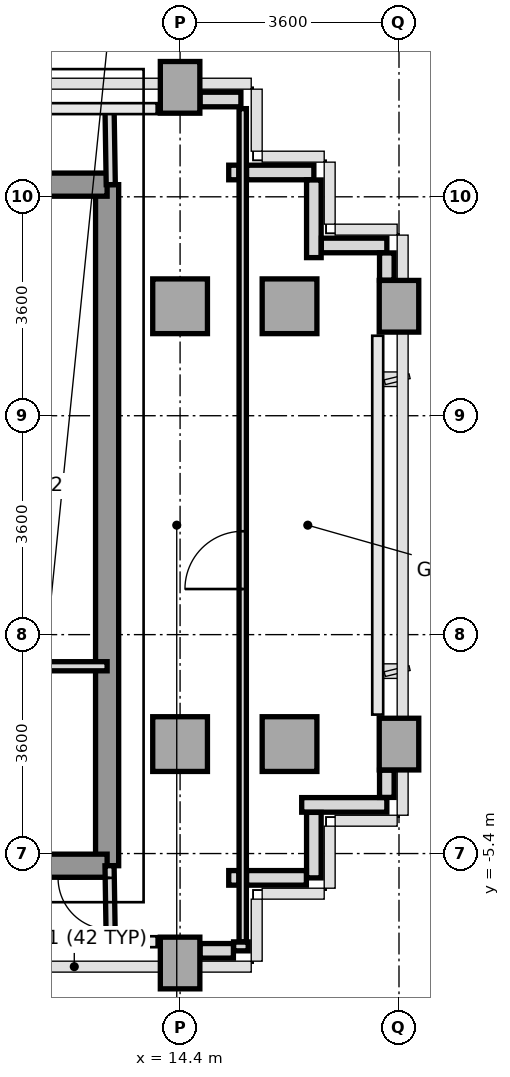
"""IFC4 building model, lengths in metres.
Left out: names, types, materials, properties, quantities, classifications, styles, units other than length and angle.
Written with IfcOpenShell. Run it as: python <this file> out.ifc"""

import sys

from ifc_helpers import new_model, si_unit, direction, frame, frame_2d, origin, origin_2d, place, context, subcontext, project, spatial, rectangle, extrude, source, transform, mapped, element, fill, save


model = new_model("IFC4")
c1 = context("Model", 3, precision=1e-05, world=origin(), true_north=direction((0.0, 1.0)))
c2 = subcontext(c1, "Body", "Model", "MODEL_VIEW")
j1 = project(units=[si_unit("LENGTHUNIT", "METRE"), si_unit("PLANEANGLEUNIT", "RADIAN")], contexts=[c1])
p1 = place(None, origin())
s1 = spatial("IfcSite", under=j1, at=p1, CompositionType="ELEMENT")
p2 = place(p1, origin())
s2 = spatial("IfcBuilding", under=s1, at=p2, CompositionType="ELEMENT")
p3 = place(p2, frame((0.0, 0.0, 163.8)))
s3 = spatial("IfcBuildingStorey", under=s2, at=p3, CompositionType="ELEMENT", Elevation=163.8)
m1 = source(origin(), c2, "Body", "SweptSolid", [
    extrude(rectangle(XDim=0.65, YDim=0.85, at=origin_2d()), origin(), (0.0, 0.0, 1.0), 3.2),
])
p4 = place(p3, frame((14.4, -7.2, 0.0), z_axis=(0.0, 0.0, 1.0), x_axis=(1.0, 0.0, 0.0)))
e1 = element("IfcColumn", 1, at=p4, inside=s3, PredefinedType="COLUMN", context=c2, shape_type="MappedRepresentation", body=[
    mapped(m1, transform((0.0, 0.0, 0.0), x_axis=(1.0, 0.0, 0.0), y_axis=(0.0, 1.0, 0.0), z_axis=(0.0, 0.0, 1.0), scale=1.0)),
])
m2 = source(origin(), c2, "Body", "SweptSolid", [
    extrude(rectangle(XDim=0.9, YDim=0.9, at=origin_2d()), origin(), (0.0, 0.0, 1.0), 3.2),
])
for number, where, z_axis, x_axis in (
    (2, (14.4, -3.6, 0.0), (0.0, 0.0, 1.0), (1.0, 0.0, 0.0)),
    (3, (14.4, 3.6, 0.0), (0.0, 0.0, 1.0), (1.0, 0.0, 0.0)),
):
    element("IfcColumn", number, at=place(p3, frame(where, z_axis=z_axis, x_axis=x_axis)), inside=s3, PredefinedType="COLUMN", context=c2, shape_type="MappedRepresentation", body=[
        mapped(m2, transform((0.0, 0.0, 0.0), x_axis=(1.0, 0.0, 0.0), y_axis=(0.0, 1.0, 0.0), z_axis=(0.0, 0.0, 1.0), scale=1.0)),
    ])
p5 = place(p3, frame((14.4, 7.2, 0.0), z_axis=(0.0, 0.0, 1.0), x_axis=(1.0, 0.0, 0.0)))
e4 = element("IfcColumn", 4, at=p5, inside=s3, PredefinedType="COLUMN", context=c2, shape_type="MappedRepresentation", body=[
    mapped(m1, transform((0.0, 0.0, 0.0), x_axis=(1.0, 0.0, 0.0), y_axis=(0.0, 1.0, 0.0), z_axis=(0.0, 0.0, 1.0), scale=1.0)),
])
for number, where, z_axis, x_axis in (
    (5, (16.2, -3.6, 0.0), (0.0, 0.0, 1.0), (1.0, 0.0, 0.0)),
    (6, (16.2, 3.6, 0.0), (0.0, 0.0, 1.0), (1.0, 0.0, 0.0)),
):
    element("IfcColumn", number, at=place(p3, frame(where, z_axis=z_axis, x_axis=x_axis)), inside=s3, PredefinedType="COLUMN", context=c2, shape_type="MappedRepresentation", body=[
        mapped(m2, transform((0.0, 0.0, 0.0), x_axis=(1.0, 0.0, 0.0), y_axis=(0.0, 1.0, 0.0), z_axis=(0.0, 0.0, 1.0), scale=1.0)),
    ])
for number, where, z_axis, x_axis in (
    (7, (18.0, -3.6, 0.0), (0.0, 0.0, 1.0), (1.0, 0.0, 0.0)),
    (8, (18.0, 3.6, 0.0), (0.0, 0.0, 1.0), (1.0, 0.0, 0.0)),
):
    element("IfcColumn", number, at=place(p3, frame(where, z_axis=z_axis, x_axis=x_axis)), inside=s3, PredefinedType="COLUMN", context=c2, shape_type="MappedRepresentation", body=[
        mapped(m1, transform((0.0, 0.0, 0.0), x_axis=(1.0, 0.0, 0.0), y_axis=(0.0, 1.0, 0.0), z_axis=(0.0, 0.0, 1.0), scale=1.0)),
    ])
p6 = place(p3, frame((17.8, -4.6, 0.0), z_axis=(0.0, 0.0, 1.0), x_axis=(-1.0, 0.0, 0.0)))
e9 = element("IfcWall", 9, at=p6, inside=s3, PredefinedType="PARAPET", context=c2, shape_type="SweptSolid", body=[
    extrude(rectangle(XDim=1.4, YDim=0.24, at=frame_2d((0.7, 0.0))), origin(), (0.0, 0.0, 1.0), 1.15),
])
p7 = place(p3, frame((16.6, -4.723, 0.0), z_axis=(0.0, 0.0, 1.0), x_axis=(0.0, -1.0, 0.0)))
e10 = element("IfcWall", 10, at=p7, inside=s3, PredefinedType="PARAPET", context=c2, shape_type="SweptSolid", body=[
    extrude(rectangle(XDim=1.077, YDim=0.24, at=frame_2d((0.539, 0.0))), origin(), (0.0, 0.0, 1.0), 1.15),
])
p8 = place(p3, frame((16.477, -5.8, 0.0), z_axis=(0.0, 0.0, 1.0), x_axis=(-1.0, 0.0, 0.0)))
e11 = element("IfcWall", 11, at=p8, inside=s3, PredefinedType="PARAPET", context=c2, shape_type="SweptSolid", body=[
    extrude(rectangle(XDim=0.984, YDim=0.24, at=frame_2d((0.492, 0.0))), origin(), (0.0, 0.0, 1.0), 1.15),
])
p9 = place(p3, frame((15.367, -5.8, 0.0), z_axis=(0.0, 0.0, 1.0), x_axis=(-1.0, 0.0, 0.0)))
e12 = element("IfcWall", 12, at=p9, inside=s3, PredefinedType="PARAPET", context=c2, shape_type="SweptSolid", body=[
    extrude(rectangle(XDim=0.167, YDim=0.24, at=frame_2d((0.083, 0.0))), origin(), (0.0, 0.0, 1.0), 1.15),
])
p10 = place(p3, frame((15.4, -6.853, 0.0), z_axis=(0.0, 0.0, 1.0), x_axis=(0.0, -1.0, 0.0)))
e13 = element("IfcWall", 13, at=p10, inside=s3, PredefinedType="PARAPET", context=c2, shape_type="SweptSolid", body=[
    extrude(rectangle(XDim=0.147, YDim=0.24, at=frame_2d((0.073, 0.0))), origin(), (0.0, 0.0, 1.0), 1.15),
])
p11 = place(p3, frame((15.277, -7.0, 0.0), z_axis=(0.0, 0.0, 1.0), x_axis=(-1.0, 0.0, 0.0)))
e14 = element("IfcWall", 14, at=p11, inside=s3, PredefinedType="PARAPET", context=c2, shape_type="SweptSolid", body=[
    extrude(rectangle(XDim=0.549, YDim=0.24, at=frame_2d((0.274, 0.0))), origin(), (0.0, 0.0, 1.0), 1.15),
])
p12 = place(p3, frame((14.728, 7.0, 0.0), z_axis=(0.0, 0.0, 1.0), x_axis=(1.0, 0.0, 0.0)))
e15 = element("IfcWall", 15, at=p12, inside=s3, PredefinedType="PARAPET", context=c2, shape_type="SweptSolid", body=[
    extrude(rectangle(XDim=0.672, YDim=0.24, at=frame_2d((0.336, 0.0))), origin(), (0.0, 0.0, 1.0), 1.15),
])
p13 = place(p3, frame((15.2, 5.8, 0.0), z_axis=(0.0, 0.0, 1.0), x_axis=(1.0, 0.0, 0.0)))
e16 = element("IfcWall", 16, at=p13, inside=s3, PredefinedType="PARAPET", context=c2, shape_type="SweptSolid", body=[
    extrude(rectangle(XDim=0.167, YDim=0.24, at=frame_2d((0.083, 0.0))), origin(), (0.0, 0.0, 1.0), 1.15),
])
p14 = place(p3, frame((15.493, 5.8, 0.0), z_axis=(0.0, 0.0, 1.0), x_axis=(1.0, 0.0, 0.0)))
e17 = element("IfcWall", 17, at=p14, inside=s3, PredefinedType="PARAPET", context=c2, shape_type="SweptSolid", body=[
    extrude(rectangle(XDim=1.107, YDim=0.24, at=frame_2d((0.554, 0.0))), origin(), (0.0, 0.0, 1.0), 1.15),
])
p15 = place(p3, frame((16.6, 5.677, 0.0), z_axis=(0.0, 0.0, 1.0), x_axis=(0.0, -1.0, 0.0)))
e18 = element("IfcWall", 18, at=p15, inside=s3, PredefinedType="PARAPET", context=c2, shape_type="SweptSolid", body=[
    extrude(rectangle(XDim=1.277, YDim=0.24, at=frame_2d((0.639, 0.0))), origin(), (0.0, 0.0, 1.0), 1.15),
])
p16 = place(p3, frame((16.723, 4.6, 0.0), z_axis=(0.0, 0.0, 1.0), x_axis=(1.0, 0.0, 0.0)))
e19 = element("IfcWall", 19, at=p16, inside=s3, PredefinedType="PARAPET", context=c2, shape_type="SweptSolid", body=[
    extrude(rectangle(XDim=1.077, YDim=0.24, at=frame_2d((0.539, 0.0))), origin(), (0.0, 0.0, 1.0), 1.15),
])
for number, where, z_axis, x_axis in (
    (20, (17.8, 4.477, 0.0), (0.0, 0.0, 1.0), (0.0, -1.0, 0.0)),
    (21, (17.8, -4.028, 0.0), (0.0, 0.0, 1.0), (0.0, -1.0, 0.0)),
):
    element("IfcWall", number, at=place(p3, frame(where, z_axis=z_axis, x_axis=x_axis)), inside=s3, PredefinedType="PARAPET", context=c2, shape_type="SweptSolid", body=[
        extrude(rectangle(XDim=0.449, YDim=0.24, at=frame_2d((0.225, 0.0))), origin(), (0.0, 0.0, 1.0), 1.15),
    ])
p17 = place(p3, frame((13.2, -5.6, 0.0), z_axis=(0.0, 0.0, 1.0), x_axis=(0.0, 1.0, 0.0)))
e22 = element("IfcWall", 22, at=p17, inside=s3, PredefinedType="SHEAR", context=c2, shape_type="SweptSolid", body=[
    extrude(rectangle(XDim=11.2, YDim=0.38, at=frame_2d((5.6, 0.0))), origin(), (0.0, 0.0, 1.0), 3.2),
])
p18 = place(p3, frame((11.356, 5.6, 0.0), z_axis=(0.0, 0.0, 1.0), x_axis=(1.0, 0.0, 0.0)))
e23 = element("IfcWall", 23, at=p18, inside=s3, PredefinedType="SHEAR", context=c2, shape_type="SweptSolid", body=[
    extrude(rectangle(XDim=1.844, YDim=0.38, at=frame_2d((0.922, 0.0))), origin(), (0.0, 0.0, 1.0), 3.2),
])
p19 = place(p3, frame((5.4, -5.6, 0.0), z_axis=(0.0, 0.0, 1.0), x_axis=(1.0, 0.0, 0.0)))
e24 = element("IfcWall", 24, at=p19, inside=s3, PredefinedType="SHEAR", context=c2, shape_type="SweptSolid", body=[
    extrude(rectangle(XDim=7.8, YDim=0.38, at=frame_2d((3.9, 0.0))), origin(), (0.0, 0.0, 1.0), 3.2),
])
p20 = place(p19, frame((3.0, 0.0, 0.0)))
e25 = element("IfcOpeningElement", 25, at=p20, cuts=e24, PredefinedType="OPENING", context=c2, shape_type="SweptSolid", body=[
    extrude(rectangle(XDim=1.2, YDim=2.2, at=frame_2d((0.6, 1.1))), frame((0.0, 0.2, 0.0), z_axis=(0.0, -1.0, 0.0), x_axis=(1.0, 0.0, 0.0)), (0.0, 0.0, 1.0), 0.4),
])
p21 = place(p19, frame((5.85, 0.0, 0.0)))
e26 = element("IfcOpeningElement", 26, at=p21, cuts=e24, PredefinedType="OPENING", context=c2, shape_type="SweptSolid", body=[
    extrude(rectangle(XDim=0.8, YDim=2.1, at=frame_2d((0.4, 1.05))), frame((0.0, 0.2, 0.0), z_axis=(0.0, -1.0, 0.0), x_axis=(1.0, 0.0, 0.0)), (0.0, 0.0, 1.0), 0.4),
])
p22 = place(p3, frame((11.02, -2.32, 0.0), z_axis=(0.0, 0.0, 1.0), x_axis=(1.0, 0.0, 0.0)))
e27 = element("IfcWall", 27, at=p22, inside=s3, PredefinedType="PARTITIONING", context=c2, shape_type="SweptSolid", body=[
    extrude(rectangle(XDim=2.18, YDim=0.15, at=frame_2d((1.09, 0.0))), origin(), (0.0, 0.0, 1.0), 3.2),
])
p23 = place(p3, frame((13.26, 5.6, 0.0), z_axis=(0.0, 0.0, 1.0), x_axis=(-0.016013571389, 0.999871774545, 0.0)))
e28 = element("IfcWall", 28, at=p23, inside=s3, PredefinedType="PARTITIONING", context=c2, shape_type="SweptSolid", body=[
    extrude(rectangle(XDim=1.25, YDim=0.15, at=frame_2d((0.625, 0.0))), origin(), (0.0, 0.0, 1.0), 3.2),
])
p24 = place(p3, frame((13.26, -6.85, 0.0), z_axis=(0.0, 0.0, 1.0), x_axis=(-0.016013571389, 0.999871774545, 0.0)))
e29 = element("IfcWall", 29, at=p24, inside=s3, PredefinedType="PARTITIONING", context=c2, shape_type="SweptSolid", body=[
    extrude(rectangle(XDim=1.25, YDim=0.15, at=frame_2d((0.625, 0.0))), origin(), (0.0, 0.0, 1.0), 3.2),
])
p25 = place(p24, frame((0.2, 0.0, 0.0)))
e30 = element("IfcOpeningElement", 30, at=p25, cuts=e29, PredefinedType="OPENING", context=c2, shape_type="SweptSolid", body=[
    extrude(rectangle(XDim=0.85, YDim=2.1, at=frame_2d((0.425, 1.05))), frame((0.0, 0.085, 0.0), z_axis=(0.0, -1.0, 0.0), x_axis=(1.0, 0.0, 0.0)), (0.0, 0.0, 1.0), 0.17),
])
p26 = place(p3, frame((15.43, -6.85, 0.0), z_axis=(0.0, 0.0, 1.0), x_axis=(0.0, 1.0, 0.0)))
e31 = element("IfcWall", 31, at=p26, inside=s3, PredefinedType="PARTITIONING", context=c2, shape_type="SweptSolid", body=[
    extrude(rectangle(XDim=13.7, YDim=0.12, at=frame_2d((6.85, 0.0))), origin(), (0.0, 0.0, 1.0), 3.2),
])
p27 = place(p26, frame((5.8, 0.0, 0.0)))
e32 = element("IfcOpeningElement", 32, at=p27, cuts=e31, PredefinedType="OPENING", context=c2, shape_type="SweptSolid", body=[
    extrude(rectangle(XDim=0.95, YDim=2.15, at=frame_2d((0.475, 1.075))), frame((0.0, 0.07, 0.0), z_axis=(0.0, -1.0, 0.0), x_axis=(1.0, 0.0, 0.0)), (0.0, 0.0, 1.0), 0.14),
])
m3 = source(origin(), c2, "Body", "SweptSolid", [
    extrude(rectangle(XDim=0.85, YDim=2.1, at=frame_2d((0.425, 1.05))), frame((0.0, 0.025, 0.0), z_axis=(0.0, -1.0, 0.0), x_axis=(1.0, 0.0, 0.0)), (0.0, 0.0, 1.0), 0.05),
])
p28 = place(p25, origin())
e33 = element("IfcDoor", 33, at=p28, inside=s3, OperationType="SINGLE_SWING_RIGHT", PredefinedType="DOOR", context=c2, shape_type="MappedRepresentation", body=[
    mapped(m3, transform((0.0, 0.0, 0.0), x_axis=(1.0, 0.0, 0.0), y_axis=(0.0, 1.0, 0.0), z_axis=(0.0, 0.0, 1.0), scale=1.0)),
])
fill(e30, e33)
m4 = source(origin(), c2, "Body", "SweptSolid", [
    extrude(rectangle(XDim=0.95, YDim=2.15, at=frame_2d((0.475, 1.075))), frame((0.0, 0.025, 0.0), z_axis=(0.0, -1.0, 0.0), x_axis=(1.0, 0.0, 0.0)), (0.0, 0.0, 1.0), 0.05),
])
p29 = place(p27, origin())
e34 = element("IfcDoor", 34, at=p29, inside=s3, OperationType="SINGLE_SWING_LEFT", PredefinedType="DOOR", context=c2, shape_type="MappedRepresentation", body=[
    mapped(m4, transform((0.0, 0.0, 0.0), x_axis=(1.0, 0.0, 0.0), y_axis=(0.0, 1.0, 0.0), z_axis=(0.0, 0.0, 1.0), scale=1.0)),
])
fill(e32, e34)
save(model, sys.argv[1])
